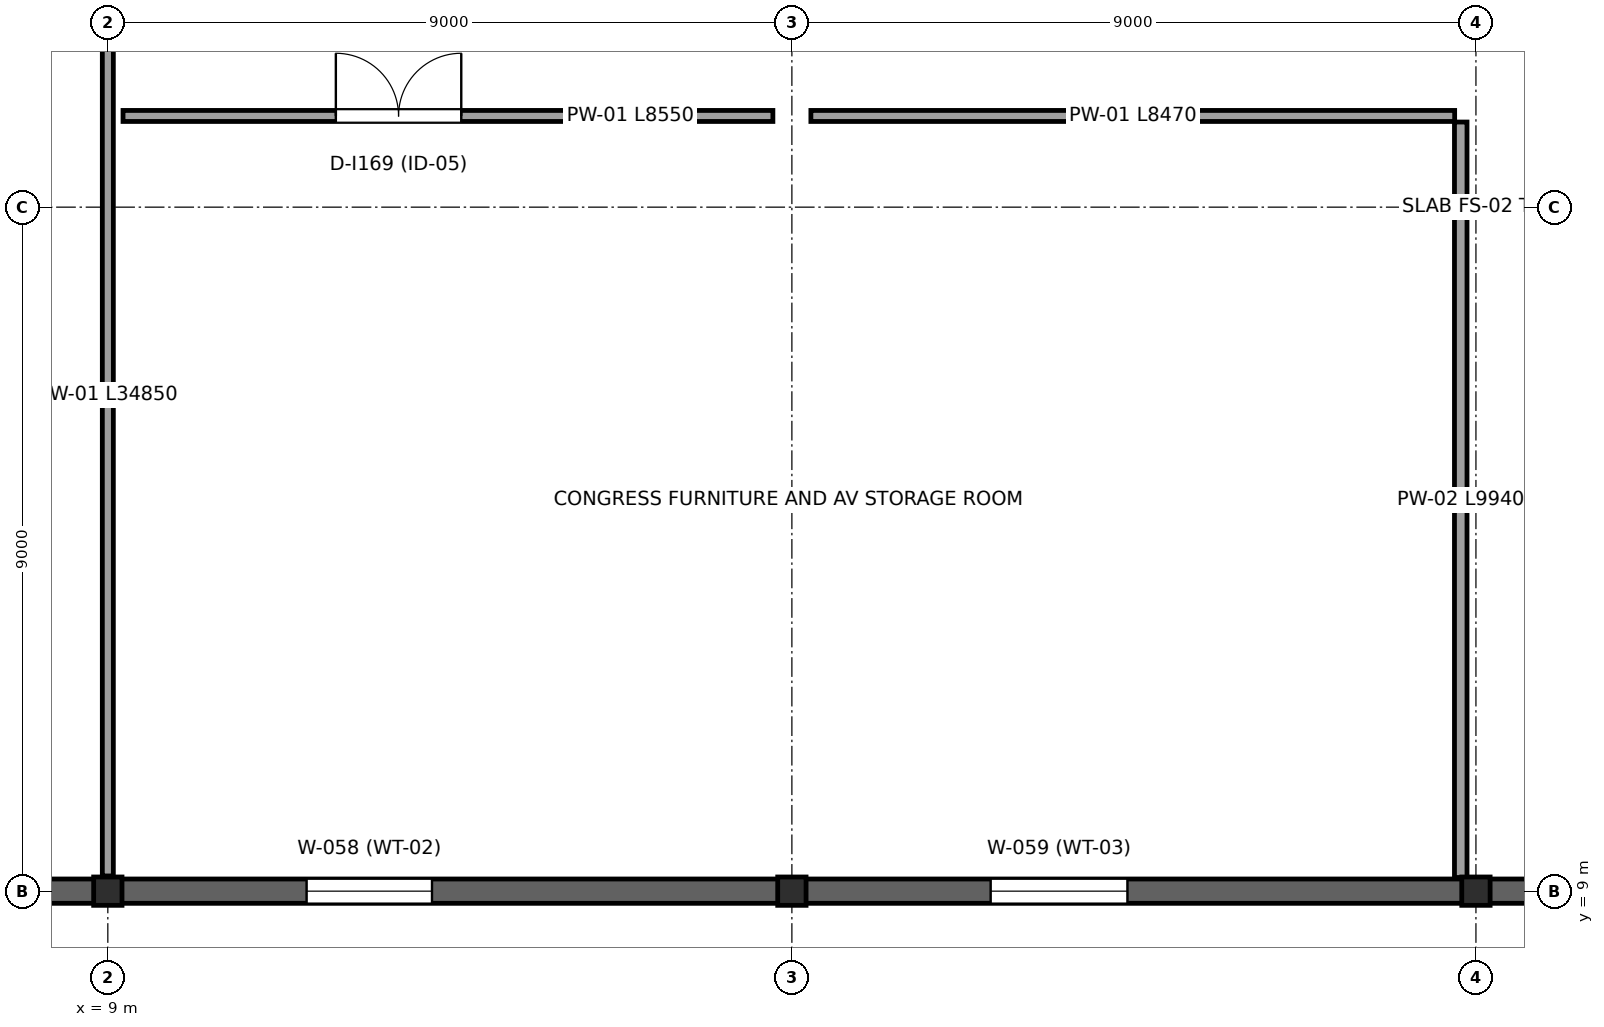
"""IFC4 building model, lengths in metres.
Left out: names, types, materials, properties, quantities, classifications, styles, units other than length and angle.
Written with IfcOpenShell. Run it as: python <this file> out.ifc"""

import sys

from ifc_helpers import new_model, si_unit, direction, frame, frame_2d, origin, origin_2d, place, context, subcontext, project, spatial, rectangle, i_section, extrude, element, fill, save


model = new_model("IFC4")
c1 = context("Model", 3, precision=1e-05, world=origin(), true_north=direction((0.0, 1.0)))
c2 = subcontext(c1, "Body", "Model", "MODEL_VIEW")
j1 = project(units=[si_unit("LENGTHUNIT", "METRE"), si_unit("PLANEANGLEUNIT", "RADIAN")], contexts=[c1])
p1 = place(None, origin())
s1 = spatial("IfcSite", under=j1, at=p1, CompositionType="ELEMENT")
p2 = place(p1, origin())
s2 = spatial("IfcBuilding", under=s1, at=p2, CompositionType="ELEMENT")
p3 = place(p2, frame((0.0, 0.0, 12.0)))
s3 = spatial("IfcBuildingStorey", under=s2, at=p3, CompositionType="ELEMENT", Elevation=12.0)
for number, where, z_axis, x_axis in (
    (1, (9.0, 9.0, 0.0), (0.0, 0.0, 1.0), (1.0, 0.0, 0.0)),
    (2, (18.0, 9.0, 0.0), (0.0, 0.0, 1.0), (1.0, 0.0, 0.0)),
    (3, (27.0, 9.0, 0.0), (0.0, 0.0, 1.0), (1.0, 0.0, 0.0)),
):
    element("IfcColumn", number, at=place(p3, frame(where, z_axis=z_axis, x_axis=x_axis)), inside=s3, PredefinedType="COLUMN", context=c2, shape_type="SweptSolid", body=[
        extrude(i_section(OverallWidth=0.373, OverallDepth=0.373, WebThickness=0.016, FlangeThickness=0.026, at=origin_2d()), origin(), (0.0, 0.0, 1.0), 5.2),
    ])
p4 = place(p3, frame((8.985, 9.0, 0.0), z_axis=(0.0, 0.0, 1.0), x_axis=(-1.0, 0.0, 0.0)))
e4 = element("IfcWall", 4, at=p4, inside=s3, PredefinedType="STANDARD", context=c2, shape_type="SweptSolid", body=[
    extrude(rectangle(XDim=8.97, YDim=0.32, at=frame_2d((4.485, 0.0))), origin(), (0.0, 0.0, 1.0), 5.05),
])
p5 = place(p4, frame((4.87, 0.0, 1.0)))
e5 = element("IfcOpeningElement", 5, at=p5, cuts=e4, PredefinedType="OPENING", context=c2, shape_type="SweptSolid", body=[
    extrude(rectangle(XDim=1.5, YDim=1.8, at=frame_2d((0.75, 0.9))), frame((0.0, 0.17, 0.0), z_axis=(0.0, -1.0, 0.0), x_axis=(1.0, 0.0, 0.0)), (0.0, 0.0, 1.0), 0.34),
])
p6 = place(p3, frame((17.985, 9.0, 0.0), z_axis=(0.0, 0.0, 1.0), x_axis=(-1.0, 0.0, 0.0)))
e6 = element("IfcWall", 6, at=p6, inside=s3, PredefinedType="STANDARD", context=c2, shape_type="SweptSolid", body=[
    extrude(rectangle(XDim=8.97, YDim=0.32, at=frame_2d((4.485, 0.0))), origin(), (0.0, 0.0, 1.0), 5.05),
])
p7 = place(p6, frame((4.72, 0.0, 1.0)))
e7 = element("IfcOpeningElement", 7, at=p7, cuts=e6, PredefinedType="OPENING", context=c2, shape_type="SweptSolid", body=[
    extrude(rectangle(XDim=1.65, YDim=1.8, at=frame_2d((0.825, 0.9))), frame((0.0, 0.17, 0.0), z_axis=(0.0, -1.0, 0.0), x_axis=(1.0, 0.0, 0.0)), (0.0, 0.0, 1.0), 0.34),
])
p8 = place(p3, frame((26.985, 9.0, 0.0), z_axis=(0.0, 0.0, 1.0), x_axis=(-1.0, 0.0, 0.0)))
e8 = element("IfcWall", 8, at=p8, inside=s3, PredefinedType="STANDARD", context=c2, shape_type="SweptSolid", body=[
    extrude(rectangle(XDim=8.97, YDim=0.32, at=frame_2d((4.485, 0.0))), origin(), (0.0, 0.0, 1.0), 5.05),
])
p9 = place(p8, frame((4.57, 0.0, 1.0)))
e9 = element("IfcOpeningElement", 9, at=p9, cuts=e8, PredefinedType="OPENING", context=c2, shape_type="SweptSolid", body=[
    extrude(rectangle(XDim=1.8, YDim=1.95, at=frame_2d((0.9, 0.975))), frame((0.0, 0.17, 0.0), z_axis=(0.0, -1.0, 0.0), x_axis=(1.0, 0.0, 0.0)), (0.0, 0.0, 1.0), 0.34),
])
p10 = place(p3, frame((35.985, 9.0, 0.0), z_axis=(0.0, 0.0, 1.0), x_axis=(-1.0, 0.0, 0.0)))
e10 = element("IfcWall", 10, at=p10, inside=s3, PredefinedType="STANDARD", context=c2, shape_type="SweptSolid", body=[
    extrude(rectangle(XDim=8.97, YDim=0.32, at=frame_2d((4.485, 0.0))), origin(), (0.0, 0.0, 1.0), 5.05),
])
p11 = place(p10, frame((4.42, 0.0, 1.0)))
e11 = element("IfcOpeningElement", 11, at=p11, cuts=e10, PredefinedType="OPENING", context=c2, shape_type="SweptSolid", body=[
    extrude(rectangle(XDim=1.95, YDim=2.1, at=frame_2d((0.975, 1.05))), frame((0.0, 0.17, 0.0), z_axis=(0.0, -1.0, 0.0), x_axis=(1.0, 0.0, 0.0)), (0.0, 0.0, 1.0), 0.34),
])
p12 = place(p3, frame((9.2, 19.2, 0.0), z_axis=(0.0, 0.0, 1.0), x_axis=(1.0, 0.0, 0.0)))
e12 = element("IfcWall", 12, at=p12, inside=s3, PredefinedType="PARTITIONING", context=c2, shape_type="SweptSolid", body=[
    extrude(rectangle(XDim=8.55, YDim=0.145, at=frame_2d((4.275, 0.0))), origin(), (0.0, 0.0, 1.0), 2.8),
])
p13 = place(p12, frame((2.8, 0.0, 0.0)))
e13 = element("IfcOpeningElement", 13, at=p13, cuts=e12, PredefinedType="OPENING", context=c2, shape_type="SweptSolid", body=[
    extrude(rectangle(XDim=1.65, YDim=2.25, at=frame_2d((0.825, 1.125))), frame((0.0, 0.083, 0.0), z_axis=(0.0, -1.0, 0.0), x_axis=(1.0, 0.0, 0.0)), (0.0, 0.0, 1.0), 0.165),
])
p14 = place(p3, frame((18.25, 19.2, 0.0), z_axis=(0.0, 0.0, 1.0), x_axis=(1.0, 0.0, 0.0)))
e14 = element("IfcWall", 14, at=p14, inside=s3, PredefinedType="PARTITIONING", context=c2, shape_type="SweptSolid", body=[
    extrude(rectangle(XDim=8.47, YDim=0.145, at=frame_2d((4.235, 0.0))), origin(), (0.0, 0.0, 1.0), 2.8),
])
p15 = place(p3, frame((26.8, 9.18, 0.0), z_axis=(0.0, 0.0, 1.0), x_axis=(0.0, 1.0, 0.0)))
e15 = element("IfcWall", 15, at=p15, inside=s3, PredefinedType="PARTITIONING", context=c2, shape_type="SweptSolid", body=[
    extrude(rectangle(XDim=9.94, YDim=0.165, at=frame_2d((4.97, 0.0))), origin(), (0.0, 0.0, 1.0), 2.8),
])
p16 = place(p3, frame((9.0, 9.2, 0.0), z_axis=(0.0, 0.0, 1.0), x_axis=(0.0, 1.0, 0.0)))
e16 = element("IfcWall", 16, at=p16, inside=s3, PredefinedType="PARTITIONING", context=c2, shape_type="SweptSolid", body=[
    extrude(rectangle(XDim=34.85, YDim=0.145, at=frame_2d((17.425, 0.0))), origin(), (0.0, 0.0, 1.0), 2.55),
])
p17 = place(p16, frame((13.0, 0.0, 0.0)))
e17 = element("IfcOpeningElement", 17, at=p17, cuts=e16, PredefinedType="OPENING", context=c2, shape_type="SweptSolid", body=[
    extrude(rectangle(XDim=1.65, YDim=2.25, at=frame_2d((0.825, 1.125))), frame((0.0, 0.083, 0.0), z_axis=(0.0, -1.0, 0.0), x_axis=(1.0, 0.0, 0.0)), (0.0, 0.0, 1.0), 0.165),
])
p18 = place(p16, frame((25.0, 0.0, 0.0)))
e18 = element("IfcOpeningElement", 18, at=p18, cuts=e16, PredefinedType="OPENING", context=c2, shape_type="SweptSolid", body=[
    extrude(rectangle(XDim=1.65, YDim=2.25, at=frame_2d((0.825, 1.125))), frame((0.0, 0.083, 0.0), z_axis=(0.0, -1.0, 0.0), x_axis=(1.0, 0.0, 0.0)), (0.0, 0.0, 1.0), 0.165),
])
p19 = place(p7, origin())
e19 = element("IfcWindow", 19, at=p19, inside=s3, PartitioningType="SINGLE_PANEL", PredefinedType="WINDOW", context=c2, shape_type="SweptSolid", body=[
    extrude(rectangle(XDim=1.65, YDim=1.8, at=frame_2d((0.825, 0.9))), frame((0.0, 0.03, 0.0), z_axis=(0.0, -1.0, 0.0), x_axis=(1.0, 0.0, 0.0)), (0.0, 0.0, 1.0), 0.06),
])
fill(e7, e19)
p20 = place(p9, origin())
e20 = element("IfcWindow", 20, at=p20, inside=s3, PartitioningType="SINGLE_PANEL", PredefinedType="WINDOW", context=c2, shape_type="SweptSolid", body=[
    extrude(rectangle(XDim=1.8, YDim=1.95, at=frame_2d((0.9, 0.975))), frame((0.0, 0.03, 0.0), z_axis=(0.0, -1.0, 0.0), x_axis=(1.0, 0.0, 0.0)), (0.0, 0.0, 1.0), 0.06),
])
fill(e9, e20)
p21 = place(p13, origin())
e21 = element("IfcDoor", 21, at=p21, inside=s3, OperationType="DOUBLE_DOOR_SINGLE_SWING", PredefinedType="DOOR", context=c2, shape_type="SweptSolid", body=[
    extrude(rectangle(XDim=1.65, YDim=2.25, at=frame_2d((0.825, 1.125))), frame((0.0, 0.025, 0.0), z_axis=(0.0, -1.0, 0.0), x_axis=(1.0, 0.0, 0.0)), (0.0, 0.0, 1.0), 0.05),
])
fill(e13, e21)
save(model, sys.argv[1])
